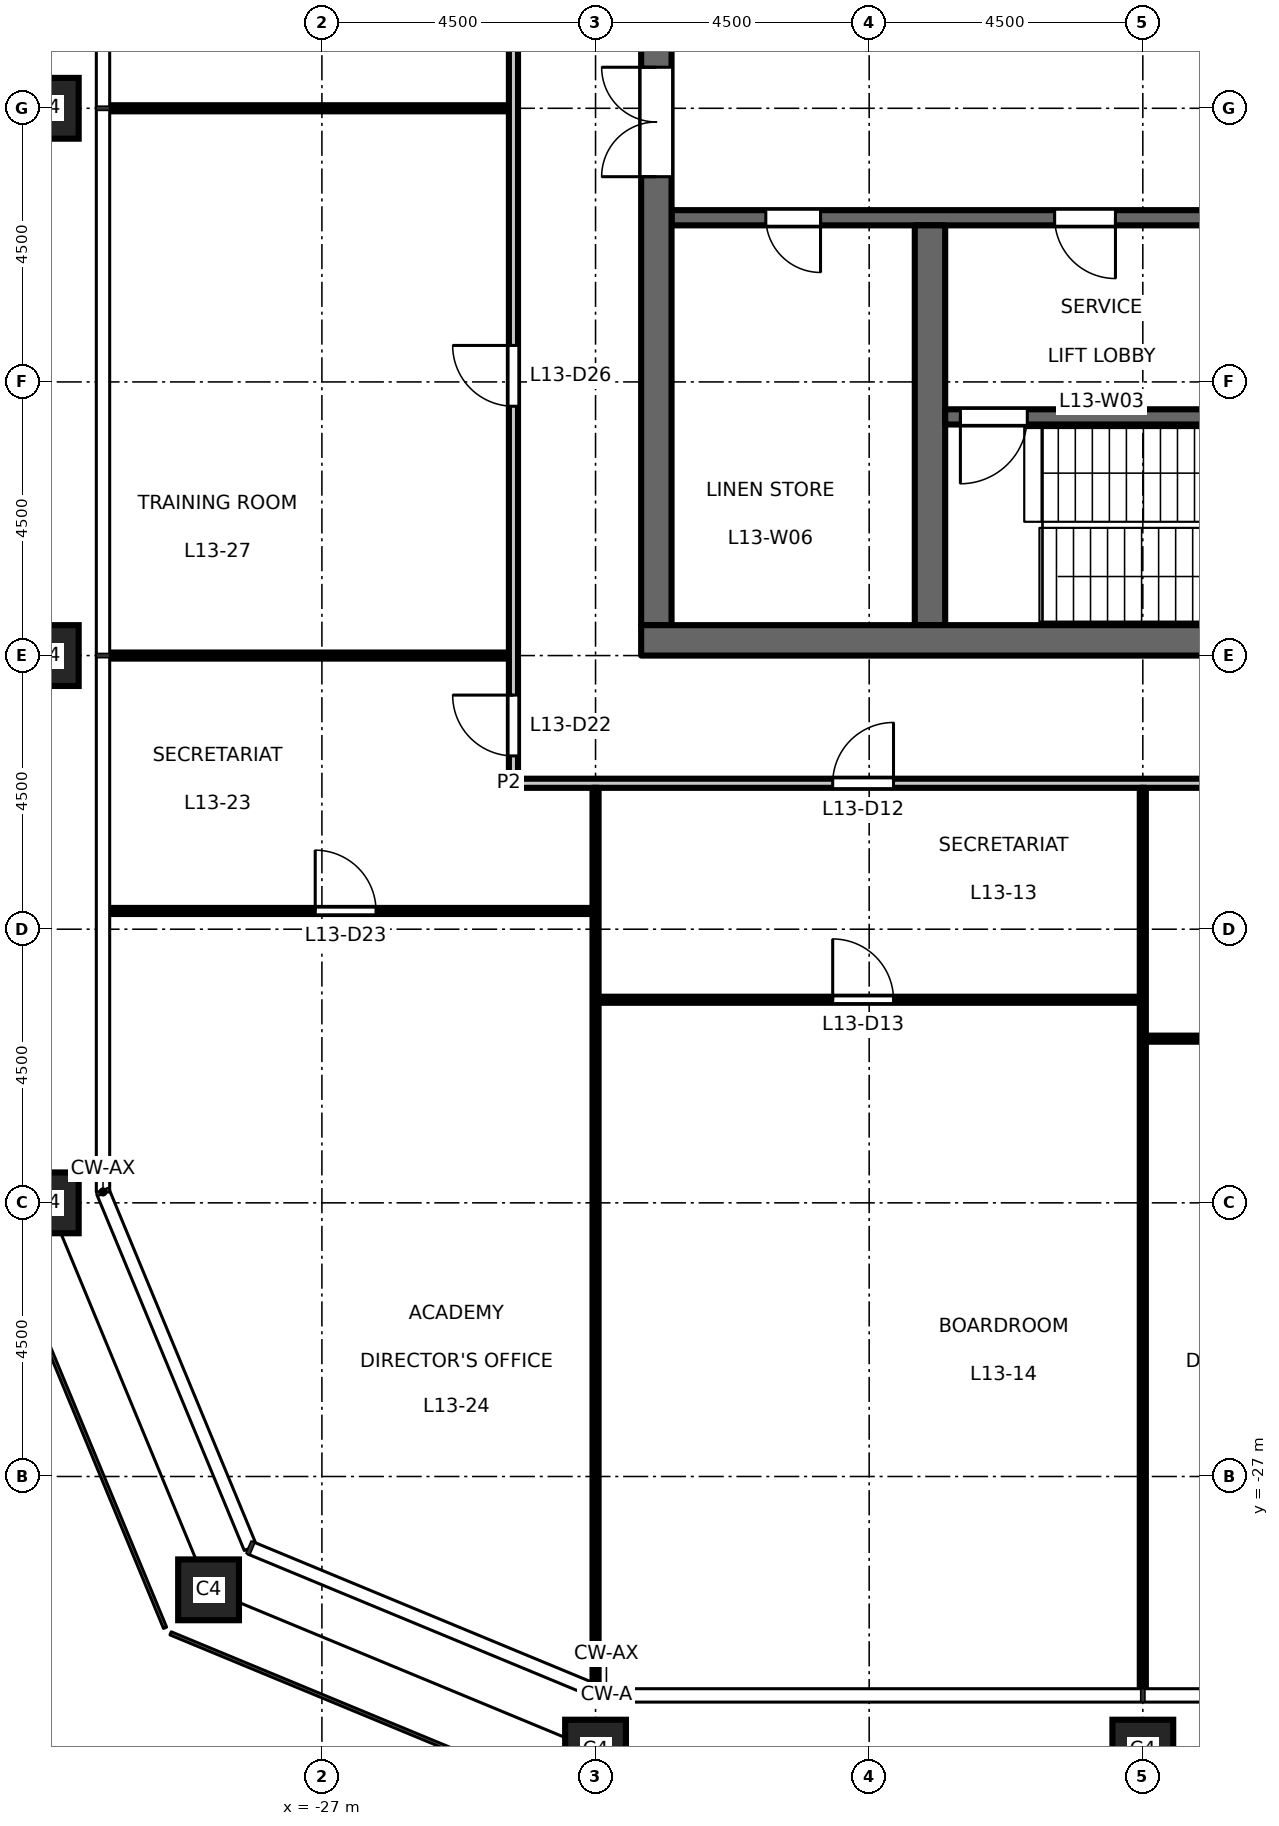
"""IFC4 building model, lengths in metres.
Left out: names, types, materials, properties, quantities, classifications, styles, units other than length and angle.
Written with IfcOpenShell. Run it as: python <this file> out.ifc"""

import sys

from ifc_helpers import new_model, si_unit, direction, frame, frame_2d, origin, origin_2d, place, context, subcontext, project, spatial, rectangle, hollow_rectangle, extrude, element, fill, save


model = new_model("IFC4")
c1 = context("Model", 3, precision=1e-05, world=origin(), true_north=direction((0.0, 1.0)))
c2 = subcontext(c1, "Body", "Model", "MODEL_VIEW")
j1 = project(units=[si_unit("LENGTHUNIT", "METRE"), si_unit("PLANEANGLEUNIT", "RADIAN")], contexts=[c1])
p1 = place(None, origin())
s1 = spatial("IfcSite", under=j1, at=p1, CompositionType="ELEMENT")
p2 = place(p1, origin())
s2 = spatial("IfcBuilding", under=s1, at=p2, CompositionType="ELEMENT")
p3 = place(p2, frame((0.0, 0.0, 62.7)))
s3 = spatial("IfcBuildingStorey", under=s2, at=p3, CompositionType="ELEMENT", Elevation=62.7)
for number, where, z_axis, x_axis in (
    (1, (-22.5, -31.5, 0.0), (0.0, 0.0, 1.0), (1.0, 0.0, 0.0)),
    (2, (-13.5, -31.5, 0.0), (0.0, 0.0, 1.0), (1.0, 0.0, 0.0)),
    (3, (-31.5, -4.5, 0.0), (0.0, 0.0, 1.0), (1.0, 0.0, 0.0)),
    (4, (-31.5, -13.5, 0.0), (0.0, 0.0, 1.0), (1.0, 0.0, 0.0)),
    (5, (-31.5, -22.5, 0.0), (0.0, 0.0, 1.0), (1.0, 0.0, 0.0)),
    (6, (-28.864, -28.864, 0.0), (0.0, 0.0, 1.0), (1.0, 0.0, 0.0)),
):
    element("IfcColumn", number, at=place(p3, frame(where, z_axis=z_axis, x_axis=x_axis)), inside=s3, PredefinedType="COLUMN", context=c2, shape_type="SweptSolid", body=[
        extrude(hollow_rectangle(XDim=1.0, YDim=1.0, WallThickness=0.06, at=origin_2d()), origin(), (0.0, 0.0, 1.0), 4.5),
    ])
p4 = place(p3, frame((-12.15, -6.3, 0.0), z_axis=(0.0, 0.0, 1.0), x_axis=(-1.0, 0.0, 0.0)))
e7 = element("IfcWall", 7, at=p4, inside=s3, PredefinedType="SHEAR", context=c2, shape_type="SweptSolid", body=[
    extrude(rectangle(XDim=9.1, YDim=0.25, at=frame_2d((4.55, 0.0))), origin(), (0.0, 0.0, 1.0), 4.35),
])
p5 = place(p4, frame((1.8, 0.0, 0.0)))
e8 = element("IfcOpeningElement", 8, at=p5, cuts=e7, PredefinedType="OPENING", context=c2, shape_type="SweptSolid", body=[
    extrude(rectangle(XDim=1.0, YDim=2.1, at=frame_2d((0.5, 1.05))), frame((0.0, 0.135, 0.0), z_axis=(0.0, -1.0, 0.0), x_axis=(1.0, 0.0, 0.0)), (0.0, 0.0, 1.0), 0.27),
])
p6 = place(p4, frame((6.65, 0.0, 0.0)))
e9 = element("IfcOpeningElement", 9, at=p6, cuts=e7, PredefinedType="OPENING", context=c2, shape_type="SweptSolid", body=[
    extrude(rectangle(XDim=0.9, YDim=2.1, at=frame_2d((0.45, 1.05))), frame((0.0, 0.135, 0.0), z_axis=(0.0, -1.0, 0.0), x_axis=(1.0, 0.0, 0.0)), (0.0, 0.0, 1.0), 0.27),
])
p7 = place(p3, frame((-21.5, -13.0, 0.0), z_axis=(0.0, 0.0, 1.0), x_axis=(0.0, 1.0, 0.0)))
e10 = element("IfcWall", 10, at=p7, inside=s3, PredefinedType="SHEAR", context=c2, shape_type="SweptSolid", body=[
    extrude(rectangle(XDim=26.0, YDim=0.5, at=frame_2d((13.0, 0.0))), origin(), (0.0, 0.0, 1.0), 4.35),
])
p8 = place(p7, frame((16.825, 0.0, 0.0)))
e11 = element("IfcOpeningElement", 11, at=p8, cuts=e10, PredefinedType="OPENING", context=c2, shape_type="SweptSolid", body=[
    extrude(rectangle(XDim=1.8, YDim=2.1, at=frame_2d((0.9, 1.05))), frame((0.0, 0.26, 0.0), z_axis=(0.0, -1.0, 0.0), x_axis=(1.0, 0.0, 0.0)), (0.0, 0.0, 1.0), 0.52),
])
p9 = place(p7, frame((7.375, 0.0, 0.0)))
e12 = element("IfcOpeningElement", 12, at=p9, cuts=e10, PredefinedType="OPENING", context=c2, shape_type="SweptSolid", body=[
    extrude(rectangle(XDim=1.8, YDim=2.1, at=frame_2d((0.9, 1.05))), frame((0.0, 0.26, 0.0), z_axis=(0.0, -1.0, 0.0), x_axis=(1.0, 0.0, 0.0)), (0.0, 0.0, 1.0), 0.52),
])
p10 = place(p7, frame((23.4, 0.0, 0.0)))
e13 = element("IfcOpeningElement", 13, at=p10, cuts=e10, PredefinedType="OPENING", context=c2, shape_type="SweptSolid", body=[
    extrude(rectangle(XDim=0.9, YDim=2.1, at=frame_2d((0.45, 1.05))), frame((0.0, 0.26, 0.0), z_axis=(0.0, -1.0, 0.0), x_axis=(1.0, 0.0, 0.0)), (0.0, 0.0, 1.0), 0.52),
])
p11 = place(p3, frame((-17.0, -13.0, 0.0), z_axis=(0.0, 0.0, 1.0), x_axis=(0.0, 1.0, 0.0)))
e14 = element("IfcWall", 14, at=p11, inside=s3, PredefinedType="SHEAR", context=c2, shape_type="SweptSolid", body=[
    extrude(rectangle(XDim=6.575, YDim=0.5, at=frame_2d((3.288, 0.0))), origin(), (0.0, 0.0, 1.0), 4.35),
])
p12 = place(p3, frame((-8.75, -9.575, 0.0), z_axis=(0.0, 0.0, 1.0), x_axis=(-1.0, 0.0, 0.0)))
e15 = element("IfcWall", 15, at=p12, inside=s3, PredefinedType="SHEAR", context=c2, shape_type="SweptSolid", body=[
    extrude(rectangle(XDim=8.0, YDim=0.25, at=frame_2d((4.0, 0.0))), origin(), (0.0, 0.0, 1.0), 4.35),
])
p13 = place(p12, frame((6.65, 0.0, 0.0)))
e16 = element("IfcOpeningElement", 16, at=p13, cuts=e15, PredefinedType="OPENING", context=c2, shape_type="SweptSolid", body=[
    extrude(rectangle(XDim=1.1, YDim=2.1, at=frame_2d((0.55, 1.05))), frame((0.0, 0.135, 0.0), z_axis=(0.0, -1.0, 0.0), x_axis=(1.0, 0.0, 0.0)), (0.0, 0.0, 1.0), 0.27),
])
p14 = place(p3, frame((-8.25, -13.25, 0.0), z_axis=(0.0, 0.0, 1.0), x_axis=(-1.0, 0.0, 0.0)))
e17 = element("IfcWall", 17, at=p14, inside=s3, PredefinedType="SHEAR", context=c2, shape_type="SweptSolid", body=[
    extrude(rectangle(XDim=13.5, YDim=0.5, at=frame_2d((6.75, 0.0))), origin(), (0.0, 0.0, 1.0), 4.35),
])
p15 = place(p3, frame((-13.45, -19.8, 0.0), z_axis=(0.0, 0.0, 1.0), x_axis=(1.0, 0.0, 0.0)))
e18 = element("IfcWall", 18, at=p15, inside=s3, PredefinedType="PARTITIONING", context=c2, shape_type="SweptSolid", body=[
    extrude(rectangle(XDim=8.9, YDim=0.1, at=frame_2d((4.45, 0.0))), origin(), (0.0, 0.0, 1.0), 4.35),
])
p16 = place(p15, frame((3.85, 0.0, 0.0)))
e19 = element("IfcOpeningElement", 19, at=p16, cuts=e18, PredefinedType="OPENING", context=c2, shape_type="SweptSolid", body=[
    extrude(rectangle(XDim=1.0, YDim=2.1, at=frame_2d((0.5, 1.05))), frame((0.0, 0.06, 0.0), z_axis=(0.0, -1.0, 0.0), x_axis=(1.0, 0.0, 0.0)), (0.0, 0.0, 1.0), 0.12),
])
p17 = place(p3, frame((-22.45, -19.16, 0.0), z_axis=(0.0, 0.0, 1.0), x_axis=(1.0, 0.0, 0.0)))
e20 = element("IfcWall", 20, at=p17, inside=s3, PredefinedType="PARTITIONING", context=c2, shape_type="SweptSolid", body=[
    extrude(rectangle(XDim=8.9, YDim=0.1, at=frame_2d((4.45, 0.0))), origin(), (0.0, 0.0, 1.0), 4.35),
])
p18 = place(p17, frame((3.85, 0.0, 0.0)))
e21 = element("IfcOpeningElement", 21, at=p18, cuts=e20, PredefinedType="OPENING", context=c2, shape_type="SweptSolid", body=[
    extrude(rectangle(XDim=1.0, YDim=2.1, at=frame_2d((0.5, 1.05))), frame((0.0, 0.06, 0.0), z_axis=(0.0, -1.0, 0.0), x_axis=(1.0, 0.0, 0.0)), (0.0, 0.0, 1.0), 0.12),
])
p19 = place(p3, frame((-30.51, -17.7, 0.0), z_axis=(0.0, 0.0, 1.0), x_axis=(1.0, 0.0, 0.0)))
e22 = element("IfcWall", 22, at=p19, inside=s3, PredefinedType="PARTITIONING", context=c2, shape_type="SweptSolid", body=[
    extrude(rectangle(XDim=7.96, YDim=0.1, at=frame_2d((3.98, 0.0))), origin(), (0.0, 0.0, 1.0), 4.35),
])
p20 = place(p19, frame((3.4, 0.0, 0.0)))
e23 = element("IfcOpeningElement", 23, at=p20, cuts=e22, PredefinedType="OPENING", context=c2, shape_type="SweptSolid", body=[
    extrude(rectangle(XDim=1.0, YDim=2.1, at=frame_2d((0.5, 1.05))), frame((0.0, 0.06, 0.0), z_axis=(0.0, -1.0, 0.0), x_axis=(1.0, 0.0, 0.0)), (0.0, 0.0, 1.0), 0.12),
])
p21 = place(p3, frame((-23.925, -15.6, 0.0), z_axis=(0.0, 0.0, 1.0), x_axis=(1.0, 0.0, 0.0)))
e24 = element("IfcWall", 24, at=p21, inside=s3, PredefinedType="PARTITIONING", context=c2, shape_type="SweptSolid", body=[
    extrude(rectangle(XDim=47.85, YDim=0.15, at=frame_2d((23.925, 0.0))), origin(), (0.0, 0.0, 1.0), 4.35),
])
p22 = place(p21, frame((5.325, 0.0, 0.0)))
e25 = element("IfcOpeningElement", 25, at=p22, cuts=e24, PredefinedType="OPENING", context=c2, shape_type="SweptSolid", body=[
    extrude(rectangle(XDim=1.0, YDim=2.1, at=frame_2d((0.5, 1.05))), frame((0.0, 0.085, 0.0), z_axis=(0.0, -1.0, 0.0), x_axis=(1.0, 0.0, 0.0)), (0.0, 0.0, 1.0), 0.17),
])
p23 = place(p21, frame((14.325, 0.0, 0.0)))
e26 = element("IfcOpeningElement", 26, at=p23, cuts=e24, PredefinedType="OPENING", context=c2, shape_type="SweptSolid", body=[
    extrude(rectangle(XDim=1.0, YDim=2.1, at=frame_2d((0.5, 1.05))), frame((0.0, 0.085, 0.0), z_axis=(0.0, -1.0, 0.0), x_axis=(1.0, 0.0, 0.0)), (0.0, 0.0, 1.0), 0.17),
])
p24 = place(p21, frame((23.325, 0.0, 0.0)))
e27 = element("IfcOpeningElement", 27, at=p24, cuts=e24, PredefinedType="OPENING", context=c2, shape_type="SweptSolid", body=[
    extrude(rectangle(XDim=1.0, YDim=2.1, at=frame_2d((0.5, 1.05))), frame((0.0, 0.085, 0.0), z_axis=(0.0, -1.0, 0.0), x_axis=(1.0, 0.0, 0.0)), (0.0, 0.0, 1.0), 0.17),
])
p25 = place(p21, frame((32.325, 0.0, 0.0)))
e28 = element("IfcOpeningElement", 28, at=p25, cuts=e24, PredefinedType="OPENING", context=c2, shape_type="SweptSolid", body=[
    extrude(rectangle(XDim=1.0, YDim=2.1, at=frame_2d((0.5, 1.05))), frame((0.0, 0.085, 0.0), z_axis=(0.0, -1.0, 0.0), x_axis=(1.0, 0.0, 0.0)), (0.0, 0.0, 1.0), 0.17),
])
p26 = place(p21, frame((41.325, 0.0, 0.0)))
e29 = element("IfcOpeningElement", 29, at=p26, cuts=e24, PredefinedType="OPENING", context=c2, shape_type="SweptSolid", body=[
    extrude(rectangle(XDim=1.0, YDim=2.1, at=frame_2d((0.5, 1.05))), frame((0.0, 0.085, 0.0), z_axis=(0.0, -1.0, 0.0), x_axis=(1.0, 0.0, 0.0)), (0.0, 0.0, 1.0), 0.17),
])
p27 = place(p3, frame((-30.51, -13.5, 0.0), z_axis=(0.0, 0.0, 1.0), x_axis=(1.0, 0.0, 0.0)))
e30 = element("IfcWall", 30, at=p27, inside=s3, PredefinedType="PARTITIONING", context=c2, shape_type="SweptSolid", body=[
    extrude(rectangle(XDim=6.585, YDim=0.1, at=frame_2d((3.292, 0.0))), origin(), (0.0, 0.0, 1.0), 3.35),
])
p28 = place(p3, frame((-30.51, -4.5, 0.0), z_axis=(0.0, 0.0, 1.0), x_axis=(1.0, 0.0, 0.0)))
e31 = element("IfcWall", 31, at=p28, inside=s3, PredefinedType="PARTITIONING", context=c2, shape_type="SweptSolid", body=[
    extrude(rectangle(XDim=6.585, YDim=0.1, at=frame_2d((3.292, 0.0))), origin(), (0.0, 0.0, 1.0), 4.35),
])
p29 = place(p3, frame((-23.85, -15.525, 0.0), z_axis=(0.0, 0.0, 1.0), x_axis=(0.0, 1.0, 0.0)))
e32 = element("IfcWall", 32, at=p29, inside=s3, PredefinedType="PARTITIONING", context=c2, shape_type="SweptSolid", body=[
    extrude(rectangle(XDim=31.05, YDim=0.15, at=frame_2d((15.525, 0.0))), origin(), (0.0, 0.0, 1.0), 4.35),
])
p30 = place(p29, frame((29.475, 0.0, 0.0)))
e33 = element("IfcOpeningElement", 33, at=p30, cuts=e32, PredefinedType="OPENING", context=c2, shape_type="SweptSolid", body=[
    extrude(rectangle(XDim=1.0, YDim=2.1, at=frame_2d((0.5, 1.05))), frame((0.0, 0.085, 0.0), z_axis=(0.0, -1.0, 0.0), x_axis=(1.0, 0.0, 0.0)), (0.0, 0.0, 1.0), 0.17),
])
p31 = place(p29, frame((0.375, 0.0, 0.0)))
e34 = element("IfcOpeningElement", 34, at=p31, cuts=e32, PredefinedType="OPENING", context=c2, shape_type="SweptSolid", body=[
    extrude(rectangle(XDim=1.0, YDim=2.1, at=frame_2d((0.5, 1.05))), frame((0.0, 0.085, 0.0), z_axis=(0.0, -1.0, 0.0), x_axis=(1.0, 0.0, 0.0)), (0.0, 0.0, 1.0), 0.17),
])
p32 = place(p29, frame((6.125, 0.0, 0.0)))
e35 = element("IfcOpeningElement", 35, at=p32, cuts=e32, PredefinedType="OPENING", context=c2, shape_type="SweptSolid", body=[
    extrude(rectangle(XDim=1.0, YDim=2.1, at=frame_2d((0.5, 1.05))), frame((0.0, 0.085, 0.0), z_axis=(0.0, -1.0, 0.0), x_axis=(1.0, 0.0, 0.0)), (0.0, 0.0, 1.0), 0.17),
])
p33 = place(p29, frame((15.125, 0.0, 0.0)))
e36 = element("IfcOpeningElement", 36, at=p33, cuts=e32, PredefinedType="OPENING", context=c2, shape_type="SweptSolid", body=[
    extrude(rectangle(XDim=1.0, YDim=2.1, at=frame_2d((0.5, 1.05))), frame((0.0, 0.085, 0.0), z_axis=(0.0, -1.0, 0.0), x_axis=(1.0, 0.0, 0.0)), (0.0, 0.0, 1.0), 0.17),
])
p34 = place(p29, frame((24.125, 0.0, 0.0)))
e37 = element("IfcOpeningElement", 37, at=p34, cuts=e32, PredefinedType="OPENING", context=c2, shape_type="SweptSolid", body=[
    extrude(rectangle(XDim=1.0, YDim=2.1, at=frame_2d((0.5, 1.05))), frame((0.0, 0.085, 0.0), z_axis=(0.0, -1.0, 0.0), x_axis=(1.0, 0.0, 0.0)), (0.0, 0.0, 1.0), 0.17),
])
p35 = place(p3, frame((-22.5, -30.428, 0.0), z_axis=(0.0, 0.0, 1.0), x_axis=(0.0, 1.0, 0.0)))
e38 = element("IfcWall", 38, at=p35, inside=s3, PredefinedType="PARTITIONING", context=c2, shape_type="SweptSolid", body=[
    extrude(rectangle(XDim=14.753, YDim=0.1, at=frame_2d((7.376, 0.0))), origin(), (0.0, 0.0, 1.0), 3.35),
])
p36 = place(p3, frame((-13.5, -30.51, 0.0), z_axis=(0.0, 0.0, 1.0), x_axis=(0.0, 1.0, 0.0)))
e39 = element("IfcWall", 39, at=p36, inside=s3, PredefinedType="PARTITIONING", context=c2, shape_type="SweptSolid", body=[
    extrude(rectangle(XDim=14.835, YDim=0.1, at=frame_2d((7.417, 0.0))), origin(), (0.0, 0.0, 1.0), 3.35),
])
p37 = place(p5, origin())
e40 = element("IfcDoor", 40, at=p37, inside=s3, OperationType="SINGLE_SWING_RIGHT", PredefinedType="DOOR", context=c2, shape_type="SweptSolid", body=[
    extrude(rectangle(XDim=1.0, YDim=2.1, at=frame_2d((0.5, 1.05))), frame((0.0, 0.025, 0.0), z_axis=(0.0, -1.0, 0.0), x_axis=(1.0, 0.0, 0.0)), (0.0, 0.0, 1.0), 0.05),
])
fill(e8, e40)
p38 = place(p13, origin())
e41 = element("IfcDoor", 41, at=p38, inside=s3, OperationType="SINGLE_SWING_LEFT", PredefinedType="DOOR", context=c2, shape_type="SweptSolid", body=[
    extrude(rectangle(XDim=1.1, YDim=2.1, at=frame_2d((0.55, 1.05))), frame((0.0, 0.025, 0.0), z_axis=(0.0, -1.0, 0.0), x_axis=(1.0, 0.0, 0.0)), (0.0, 0.0, 1.0), 0.05),
])
fill(e16, e41)
p39 = place(p9, origin())
e42 = element("IfcDoor", 42, at=p39, inside=s3, OperationType="DOUBLE_DOOR_DOUBLE_SWING", PredefinedType="DOOR", context=c2, shape_type="SweptSolid", body=[
    extrude(rectangle(XDim=1.8, YDim=2.1, at=frame_2d((0.9, 1.05))), frame((0.0, 0.025, 0.0), z_axis=(0.0, -1.0, 0.0), x_axis=(1.0, 0.0, 0.0)), (0.0, 0.0, 1.0), 0.05),
])
fill(e12, e42)
p40 = place(p6, origin())
e43 = element("IfcDoor", 43, at=p40, inside=s3, OperationType="SINGLE_SWING_RIGHT", PredefinedType="DOOR", context=c2, shape_type="SweptSolid", body=[
    extrude(rectangle(XDim=0.9, YDim=2.1, at=frame_2d((0.45, 1.05))), frame((0.0, 0.025, 0.0), z_axis=(0.0, -1.0, 0.0), x_axis=(1.0, 0.0, 0.0)), (0.0, 0.0, 1.0), 0.05),
])
fill(e9, e43)
p41 = place(p22, origin())
e44 = element("IfcDoor", 44, at=p41, inside=s3, OperationType="SINGLE_SWING_RIGHT", PredefinedType="DOOR", context=c2, shape_type="SweptSolid", body=[
    extrude(rectangle(XDim=1.0, YDim=2.1, at=frame_2d((0.5, 1.05))), frame((0.0, 0.025, 0.0), z_axis=(0.0, -1.0, 0.0), x_axis=(1.0, 0.0, 0.0)), (0.0, 0.0, 1.0), 0.05),
])
fill(e25, e44)
p42 = place(p18, origin())
e45 = element("IfcDoor", 45, at=p42, inside=s3, OperationType="SINGLE_SWING_LEFT", PredefinedType="DOOR", context=c2, shape_type="SweptSolid", body=[
    extrude(rectangle(XDim=1.0, YDim=2.1, at=frame_2d((0.5, 1.05))), frame((0.0, 0.025, 0.0), z_axis=(0.0, -1.0, 0.0), x_axis=(1.0, 0.0, 0.0)), (0.0, 0.0, 1.0), 0.05),
])
fill(e21, e45)
p43 = place(p31, origin())
e46 = element("IfcDoor", 46, at=p43, inside=s3, OperationType="SINGLE_SWING_RIGHT", PredefinedType="DOOR", context=c2, shape_type="SweptSolid", body=[
    extrude(rectangle(XDim=1.0, YDim=2.1, at=frame_2d((0.5, 1.05))), frame((0.0, 0.025, 0.0), z_axis=(0.0, -1.0, 0.0), x_axis=(1.0, 0.0, 0.0)), (0.0, 0.0, 1.0), 0.05),
])
fill(e34, e46)
p44 = place(p20, origin())
e47 = element("IfcDoor", 47, at=p44, inside=s3, OperationType="SINGLE_SWING_LEFT", PredefinedType="DOOR", context=c2, shape_type="SweptSolid", body=[
    extrude(rectangle(XDim=1.0, YDim=2.1, at=frame_2d((0.5, 1.05))), frame((0.0, 0.025, 0.0), z_axis=(0.0, -1.0, 0.0), x_axis=(1.0, 0.0, 0.0)), (0.0, 0.0, 1.0), 0.05),
])
fill(e23, e47)
p45 = place(p32, origin())
e48 = element("IfcDoor", 48, at=p45, inside=s3, OperationType="SINGLE_SWING_RIGHT", PredefinedType="DOOR", context=c2, shape_type="SweptSolid", body=[
    extrude(rectangle(XDim=1.0, YDim=2.1, at=frame_2d((0.5, 1.05))), frame((0.0, 0.025, 0.0), z_axis=(0.0, -1.0, 0.0), x_axis=(1.0, 0.0, 0.0)), (0.0, 0.0, 1.0), 0.05),
])
fill(e35, e48)
save(model, sys.argv[1])
